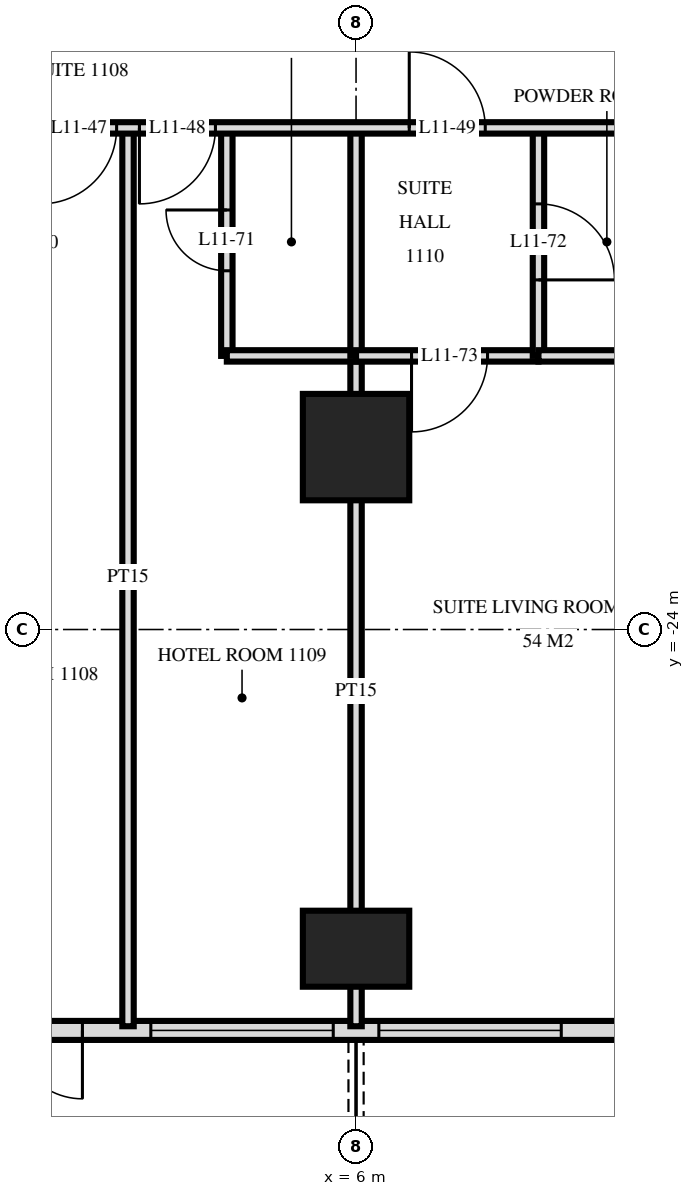
"""IFC4 building model, lengths in metres.
Left out: names, types, materials, properties, quantities, classifications, styles, units other than length and angle.
Written with IfcOpenShell. Run it as: python <this file> out.ifc"""

import sys

from ifc_helpers import new_model, si_unit, direction, frame, frame_2d, origin, origin_2d, place, context, subcontext, project, spatial, rectangle, extrude, element, fill, save


model = new_model("IFC4")
c1 = context("Model", 3, precision=1e-05, world=origin(), true_north=direction((0.0, 1.0)))
c2 = subcontext(c1, "Body", "Model", "MODEL_VIEW")
j1 = project(units=[si_unit("LENGTHUNIT", "METRE"), si_unit("PLANEANGLEUNIT", "RADIAN")], contexts=[c1])
p1 = place(None, origin())
s1 = spatial("IfcSite", under=j1, at=p1, CompositionType="ELEMENT")
p2 = place(p1, origin())
s2 = spatial("IfcBuilding", under=s1, at=p2, CompositionType="ELEMENT")
p3 = place(p2, frame((0.0, 0.0, 49.2)))
s3 = spatial("IfcBuildingStorey", under=s2, at=p3, CompositionType="ELEMENT", Elevation=49.2)
p4 = place(p3, frame((6.0, -28.2, 0.0), z_axis=(0.0, 0.0, 1.0), x_axis=(1.0, 0.0, 0.0)))
e1 = element("IfcColumn", 1, at=p4, inside=s3, PredefinedType="COLUMN", context=c2, shape_type="SweptSolid", body=[
    extrude(rectangle(XDim=1.4, YDim=1.0, at=origin_2d()), origin(), (0.0, 0.0, 1.0), 3.6),
])
p5 = place(p3, frame((6.0, -21.6, 0.0), z_axis=(0.0, 0.0, 1.0), x_axis=(1.0, 0.0, 0.0)))
e2 = element("IfcColumn", 2, at=p5, inside=s3, PredefinedType="COLUMN", context=c2, shape_type="SweptSolid", body=[
    extrude(rectangle(XDim=1.4, YDim=1.4, at=origin_2d()), origin(), (0.0, 0.0, 1.0), 3.6),
])
p6 = place(p3, frame((-28.775, -29.275, 0.0), z_axis=(0.0, 0.0, 1.0), x_axis=(1.0, 0.0, 0.0)))
e3 = element("IfcWall", 3, at=p6, inside=s3, PredefinedType="SOLIDWALL", context=c2, shape_type="SweptSolid", body=[
    extrude(rectangle(XDim=57.551, YDim=0.25, at=frame_2d((28.775, 0.0))), origin(), (0.0, 0.0, 1.0), 3.32),
])
p7 = place(p6, frame((0.575, 0.0, 0.0)))
e4 = element("IfcOpeningElement", 4, at=p7, cuts=e3, PredefinedType="OPENING", context=c2, shape_type="SweptSolid", body=[
    extrude(rectangle(XDim=1.8, YDim=2.4, at=frame_2d((0.9, 1.2))), frame((0.0, 0.135, 0.0), z_axis=(0.0, -1.0, 0.0), x_axis=(1.0, 0.0, 0.0)), (0.0, 0.0, 1.0), 0.27),
])
p8 = place(p6, frame((5.375, 0.0, 0.0)))
e5 = element("IfcOpeningElement", 5, at=p8, cuts=e3, PredefinedType="OPENING", context=c2, shape_type="SweptSolid", body=[
    extrude(rectangle(XDim=1.8, YDim=2.4, at=frame_2d((0.9, 1.2))), frame((0.0, 0.135, 0.0), z_axis=(0.0, -1.0, 0.0), x_axis=(1.0, 0.0, 0.0)), (0.0, 0.0, 1.0), 0.27),
])
p9 = place(p6, frame((8.075, 0.0, 0.3)))
e6 = element("IfcOpeningElement", 6, at=p9, cuts=e3, PredefinedType="OPENING", context=c2, shape_type="SweptSolid", body=[
    extrude(rectangle(XDim=2.4, YDim=2.1, at=frame_2d((1.2, 1.05))), frame((0.0, 0.135, 0.0), z_axis=(0.0, -1.0, 0.0), x_axis=(1.0, 0.0, 0.0)), (0.0, 0.0, 1.0), 0.27),
])
p10 = place(p6, frame((11.375, 0.0, 0.0)))
e7 = element("IfcOpeningElement", 7, at=p10, cuts=e3, PredefinedType="OPENING", context=c2, shape_type="SweptSolid", body=[
    extrude(rectangle(XDim=1.8, YDim=2.4, at=frame_2d((0.9, 1.2))), frame((0.0, 0.135, 0.0), z_axis=(0.0, -1.0, 0.0), x_axis=(1.0, 0.0, 0.0)), (0.0, 0.0, 1.0), 0.27),
])
p11 = place(p6, frame((14.075, 0.0, 0.3)))
e8 = element("IfcOpeningElement", 8, at=p11, cuts=e3, PredefinedType="OPENING", context=c2, shape_type="SweptSolid", body=[
    extrude(rectangle(XDim=2.4, YDim=2.1, at=frame_2d((1.2, 1.05))), frame((0.0, 0.135, 0.0), z_axis=(0.0, -1.0, 0.0), x_axis=(1.0, 0.0, 0.0)), (0.0, 0.0, 1.0), 0.27),
])
p12 = place(p6, frame((17.375, 0.0, 0.0)))
e9 = element("IfcOpeningElement", 9, at=p12, cuts=e3, PredefinedType="OPENING", context=c2, shape_type="SweptSolid", body=[
    extrude(rectangle(XDim=1.8, YDim=2.4, at=frame_2d((0.9, 1.2))), frame((0.0, 0.135, 0.0), z_axis=(0.0, -1.0, 0.0), x_axis=(1.0, 0.0, 0.0)), (0.0, 0.0, 1.0), 0.27),
])
p13 = place(p6, frame((20.075, 0.0, 0.3)))
e10 = element("IfcOpeningElement", 10, at=p13, cuts=e3, PredefinedType="OPENING", context=c2, shape_type="SweptSolid", body=[
    extrude(rectangle(XDim=2.4, YDim=2.1, at=frame_2d((1.2, 1.05))), frame((0.0, 0.135, 0.0), z_axis=(0.0, -1.0, 0.0), x_axis=(1.0, 0.0, 0.0)), (0.0, 0.0, 1.0), 0.27),
])
p14 = place(p6, frame((23.075, 0.0, 0.3)))
e11 = element("IfcOpeningElement", 11, at=p14, cuts=e3, PredefinedType="OPENING", context=c2, shape_type="SweptSolid", body=[
    extrude(rectangle(XDim=2.4, YDim=2.1, at=frame_2d((1.2, 1.05))), frame((0.0, 0.135, 0.0), z_axis=(0.0, -1.0, 0.0), x_axis=(1.0, 0.0, 0.0)), (0.0, 0.0, 1.0), 0.27),
])
p15 = place(p6, frame((26.375, 0.0, 0.0)))
e12 = element("IfcOpeningElement", 12, at=p15, cuts=e3, PredefinedType="OPENING", context=c2, shape_type="SweptSolid", body=[
    extrude(rectangle(XDim=1.8, YDim=2.4, at=frame_2d((0.9, 1.2))), frame((0.0, 0.135, 0.0), z_axis=(0.0, -1.0, 0.0), x_axis=(1.0, 0.0, 0.0)), (0.0, 0.0, 1.0), 0.27),
])
p16 = place(p6, frame((29.375, 0.0, 0.0)))
e13 = element("IfcOpeningElement", 13, at=p16, cuts=e3, PredefinedType="OPENING", context=c2, shape_type="SweptSolid", body=[
    extrude(rectangle(XDim=1.8, YDim=2.4, at=frame_2d((0.9, 1.2))), frame((0.0, 0.135, 0.0), z_axis=(0.0, -1.0, 0.0), x_axis=(1.0, 0.0, 0.0)), (0.0, 0.0, 1.0), 0.27),
])
p17 = place(p6, frame((32.075, 0.0, 0.3)))
e14 = element("IfcOpeningElement", 14, at=p17, cuts=e3, PredefinedType="OPENING", context=c2, shape_type="SweptSolid", body=[
    extrude(rectangle(XDim=2.4, YDim=2.1, at=frame_2d((1.2, 1.05))), frame((0.0, 0.135, 0.0), z_axis=(0.0, -1.0, 0.0), x_axis=(1.0, 0.0, 0.0)), (0.0, 0.0, 1.0), 0.27),
])
p18 = place(p6, frame((35.075, 0.0, 0.3)))
e15 = element("IfcOpeningElement", 15, at=p18, cuts=e3, PredefinedType="OPENING", context=c2, shape_type="SweptSolid", body=[
    extrude(rectangle(XDim=2.4, YDim=2.1, at=frame_2d((1.2, 1.05))), frame((0.0, 0.135, 0.0), z_axis=(0.0, -1.0, 0.0), x_axis=(1.0, 0.0, 0.0)), (0.0, 0.0, 1.0), 0.27),
])
p19 = place(p6, frame((38.375, 0.0, 0.0)))
e16 = element("IfcOpeningElement", 16, at=p19, cuts=e3, PredefinedType="OPENING", context=c2, shape_type="SweptSolid", body=[
    extrude(rectangle(XDim=1.8, YDim=2.4, at=frame_2d((0.9, 1.2))), frame((0.0, 0.135, 0.0), z_axis=(0.0, -1.0, 0.0), x_axis=(1.0, 0.0, 0.0)), (0.0, 0.0, 1.0), 0.27),
])
p20 = place(p6, frame((41.375, 0.0, 0.0)))
e17 = element("IfcOpeningElement", 17, at=p20, cuts=e3, PredefinedType="OPENING", context=c2, shape_type="SweptSolid", body=[
    extrude(rectangle(XDim=1.8, YDim=2.4, at=frame_2d((0.9, 1.2))), frame((0.0, 0.135, 0.0), z_axis=(0.0, -1.0, 0.0), x_axis=(1.0, 0.0, 0.0)), (0.0, 0.0, 1.0), 0.27),
])
p21 = place(p6, frame((44.075, 0.0, 0.3)))
e18 = element("IfcOpeningElement", 18, at=p21, cuts=e3, PredefinedType="OPENING", context=c2, shape_type="SweptSolid", body=[
    extrude(rectangle(XDim=2.4, YDim=2.1, at=frame_2d((1.2, 1.05))), frame((0.0, 0.135, 0.0), z_axis=(0.0, -1.0, 0.0), x_axis=(1.0, 0.0, 0.0)), (0.0, 0.0, 1.0), 0.27),
])
p22 = place(p6, frame((47.075, 0.0, 0.3)))
e19 = element("IfcOpeningElement", 19, at=p22, cuts=e3, PredefinedType="OPENING", context=c2, shape_type="SweptSolid", body=[
    extrude(rectangle(XDim=2.4, YDim=2.1, at=frame_2d((1.2, 1.05))), frame((0.0, 0.135, 0.0), z_axis=(0.0, -1.0, 0.0), x_axis=(1.0, 0.0, 0.0)), (0.0, 0.0, 1.0), 0.27),
])
p23 = place(p6, frame((50.375, 0.0, 0.0)))
e20 = element("IfcOpeningElement", 20, at=p23, cuts=e3, PredefinedType="OPENING", context=c2, shape_type="SweptSolid", body=[
    extrude(rectangle(XDim=1.8, YDim=2.4, at=frame_2d((0.9, 1.2))), frame((0.0, 0.135, 0.0), z_axis=(0.0, -1.0, 0.0), x_axis=(1.0, 0.0, 0.0)), (0.0, 0.0, 1.0), 0.27),
])
p24 = place(p6, frame((53.375, 0.0, 0.0)))
e21 = element("IfcOpeningElement", 21, at=p24, cuts=e3, PredefinedType="OPENING", context=c2, shape_type="SweptSolid", body=[
    extrude(rectangle(XDim=1.8, YDim=2.4, at=frame_2d((0.9, 1.2))), frame((0.0, 0.135, 0.0), z_axis=(0.0, -1.0, 0.0), x_axis=(1.0, 0.0, 0.0)), (0.0, 0.0, 1.0), 0.27),
])
p25 = place(p3, frame((8.4, -20.4, 0.0), z_axis=(0.0, 0.0, 1.0), x_axis=(0.0, 1.0, 0.0)))
e22 = element("IfcWall", 22, at=p25, inside=s3, PredefinedType="PARTITIONING", context=c2, shape_type="SweptSolid", body=[
    extrude(rectangle(XDim=3.0, YDim=0.15, at=frame_2d((1.5, 0.0))), origin(), (0.0, 0.0, 1.0), 3.32),
])
p26 = place(p25, frame((1.0, 0.0, 0.0)))
e23 = element("IfcOpeningElement", 23, at=p26, cuts=e22, PredefinedType="OPENING", context=c2, shape_type="SweptSolid", body=[
    extrude(rectangle(XDim=1.0, YDim=2.1, at=frame_2d((0.5, 1.05))), frame((0.0, 0.085, 0.0), z_axis=(0.0, -1.0, 0.0), x_axis=(1.0, 0.0, 0.0)), (0.0, 0.0, 1.0), 0.17),
])
p27 = place(p3, frame((6.0, -20.4, 0.0), z_axis=(0.0, 0.0, 1.0), x_axis=(0.0, 1.0, 0.0)))
e24 = element("IfcWall", 24, at=p27, inside=s3, PredefinedType="PARTITIONING", context=c2, shape_type="SweptSolid", body=[
    extrude(rectangle(XDim=3.0, YDim=0.15, at=frame_2d((1.5, 0.0))), origin(), (0.0, 0.0, 1.0), 3.32),
])
p28 = place(p3, frame((6.0, -29.22, 0.0), z_axis=(0.0, 0.0, 1.0), x_axis=(0.0, 1.0, 0.0)))
e25 = element("IfcWall", 25, at=p28, inside=s3, PredefinedType="PARTITIONING", context=c2, shape_type="SweptSolid", body=[
    extrude(rectangle(XDim=8.82, YDim=0.15, at=frame_2d((4.41, 0.0))), origin(), (0.0, 0.0, 1.0), 3.32),
])
p29 = place(p3, frame((4.3, -20.4, 0.0), z_axis=(0.0, 0.0, 1.0), x_axis=(0.0, 1.0, 0.0)))
e26 = element("IfcWall", 26, at=p29, inside=s3, PredefinedType="PARTITIONING", context=c2, shape_type="SweptSolid", body=[
    extrude(rectangle(XDim=3.0, YDim=0.15, at=frame_2d((1.5, 0.0))), origin(), (0.0, 0.0, 1.0), 3.32),
])
p30 = place(p29, frame((1.12, 0.0, 0.0)))
e27 = element("IfcOpeningElement", 27, at=p30, cuts=e26, PredefinedType="OPENING", context=c2, shape_type="SweptSolid", body=[
    extrude(rectangle(XDim=0.8, YDim=2.1, at=frame_2d((0.4, 1.05))), frame((0.0, 0.085, 0.0), z_axis=(0.0, -1.0, 0.0), x_axis=(1.0, 0.0, 0.0)), (0.0, 0.0, 1.0), 0.17),
])
p31 = place(p3, frame((3.0, -29.22, 0.0), z_axis=(0.0, 0.0, 1.0), x_axis=(0.0, 1.0, 0.0)))
e28 = element("IfcWall", 28, at=p31, inside=s3, PredefinedType="PARTITIONING", context=c2, shape_type="SweptSolid", body=[
    extrude(rectangle(XDim=11.82, YDim=0.15, at=frame_2d((5.91, 0.0))), origin(), (0.0, 0.0, 1.0), 3.32),
])
p32 = place(p3, frame((6.0, -20.4, 0.0), z_axis=(0.0, 0.0, 1.0), x_axis=(1.0, 0.0, 0.0)))
e29 = element("IfcWall", 29, at=p32, inside=s3, PredefinedType="PARTITIONING", context=c2, shape_type="SweptSolid", body=[
    extrude(rectangle(XDim=2.4, YDim=0.15, at=frame_2d((1.2, 0.0))), origin(), (0.0, 0.0, 1.0), 3.32),
])
p33 = place(p32, frame((0.73, 0.0, 0.0)))
e30 = element("IfcOpeningElement", 30, at=p33, cuts=e29, PredefinedType="OPENING", context=c2, shape_type="SweptSolid", body=[
    extrude(rectangle(XDim=1.0, YDim=2.1, at=frame_2d((0.5, 1.05))), frame((0.0, 0.085, 0.0), z_axis=(0.0, -1.0, 0.0), x_axis=(1.0, 0.0, 0.0)), (0.0, 0.0, 1.0), 0.17),
])
p34 = place(p3, frame((4.3, -20.4, 0.0), z_axis=(0.0, 0.0, 1.0), x_axis=(1.0, 0.0, 0.0)))
e31 = element("IfcWall", 31, at=p34, inside=s3, PredefinedType="PARTITIONING", context=c2, shape_type="SweptSolid", body=[
    extrude(rectangle(XDim=1.7, YDim=0.15, at=frame_2d((0.85, 0.0))), origin(), (0.0, 0.0, 1.0), 3.32),
])
p35 = place(p3, frame((8.4, -20.4, 0.0), z_axis=(0.0, 0.0, 1.0), x_axis=(1.0, 0.0, 0.0)))
e32 = element("IfcWall", 32, at=p35, inside=s3, PredefinedType="PLUMBINGWALL", context=c2, shape_type="SweptSolid", body=[
    extrude(rectangle(XDim=1.8, YDim=0.15, at=frame_2d((0.9, 0.0))), origin(), (0.0, 0.0, 1.0), 3.32),
])
p36 = place(p3, frame((-33.12, -17.4, 0.0), z_axis=(0.0, 0.0, 1.0), x_axis=(1.0, 0.0, 0.0)))
e33 = element("IfcWall", 33, at=p36, inside=s3, PredefinedType="PARTITIONING", context=c2, shape_type="SweptSolid", body=[
    extrude(rectangle(XDim=66.24, YDim=0.15, at=frame_2d((33.12, 0.0))), origin(), (0.0, 0.0, 1.0), 3.32),
])
p37 = place(p36, frame((9.27, 0.0, 0.0)))
e34 = element("IfcOpeningElement", 34, at=p37, cuts=e33, PredefinedType="OPENING", context=c2, shape_type="SweptSolid", body=[
    extrude(rectangle(XDim=1.0, YDim=2.1, at=frame_2d((0.5, 1.05))), frame((0.0, 0.085, 0.0), z_axis=(0.0, -1.0, 0.0), x_axis=(1.0, 0.0, 0.0)), (0.0, 0.0, 1.0), 0.17),
])
p38 = place(p36, frame((13.97, 0.0, 0.0)))
e35 = element("IfcOpeningElement", 35, at=p38, cuts=e33, PredefinedType="OPENING", context=c2, shape_type="SweptSolid", body=[
    extrude(rectangle(XDim=1.0, YDim=2.1, at=frame_2d((0.5, 1.05))), frame((0.0, 0.085, 0.0), z_axis=(0.0, -1.0, 0.0), x_axis=(1.0, 0.0, 0.0)), (0.0, 0.0, 1.0), 0.17),
])
p39 = place(p36, frame((15.27, 0.0, 0.0)))
e36 = element("IfcOpeningElement", 36, at=p39, cuts=e33, PredefinedType="OPENING", context=c2, shape_type="SweptSolid", body=[
    extrude(rectangle(XDim=1.0, YDim=2.1, at=frame_2d((0.5, 1.05))), frame((0.0, 0.085, 0.0), z_axis=(0.0, -1.0, 0.0), x_axis=(1.0, 0.0, 0.0)), (0.0, 0.0, 1.0), 0.17),
])
p40 = place(p36, frame((19.97, 0.0, 0.0)))
e37 = element("IfcOpeningElement", 37, at=p40, cuts=e33, PredefinedType="OPENING", context=c2, shape_type="SweptSolid", body=[
    extrude(rectangle(XDim=1.0, YDim=2.1, at=frame_2d((0.5, 1.05))), frame((0.0, 0.085, 0.0), z_axis=(0.0, -1.0, 0.0), x_axis=(1.0, 0.0, 0.0)), (0.0, 0.0, 1.0), 0.17),
])
p41 = place(p36, frame((22.27, 0.0, 0.0)))
e38 = element("IfcOpeningElement", 38, at=p41, cuts=e33, PredefinedType="OPENING", context=c2, shape_type="SweptSolid", body=[
    extrude(rectangle(XDim=1.0, YDim=2.1, at=frame_2d((0.5, 1.05))), frame((0.0, 0.085, 0.0), z_axis=(0.0, -1.0, 0.0), x_axis=(1.0, 0.0, 0.0)), (0.0, 0.0, 1.0), 0.17),
])
p42 = place(p36, frame((28.97, 0.0, 0.0)))
e39 = element("IfcOpeningElement", 39, at=p42, cuts=e33, PredefinedType="OPENING", context=c2, shape_type="SweptSolid", body=[
    extrude(rectangle(XDim=1.0, YDim=2.1, at=frame_2d((0.5, 1.05))), frame((0.0, 0.085, 0.0), z_axis=(0.0, -1.0, 0.0), x_axis=(1.0, 0.0, 0.0)), (0.0, 0.0, 1.0), 0.17),
])
p43 = place(p36, frame((30.27, 0.0, 0.0)))
e40 = element("IfcOpeningElement", 40, at=p43, cuts=e33, PredefinedType="OPENING", context=c2, shape_type="SweptSolid", body=[
    extrude(rectangle(XDim=1.0, YDim=2.1, at=frame_2d((0.5, 1.05))), frame((0.0, 0.085, 0.0), z_axis=(0.0, -1.0, 0.0), x_axis=(1.0, 0.0, 0.0)), (0.0, 0.0, 1.0), 0.17),
])
p44 = place(p36, frame((34.97, 0.0, 0.0)))
e41 = element("IfcOpeningElement", 41, at=p44, cuts=e33, PredefinedType="OPENING", context=c2, shape_type="SweptSolid", body=[
    extrude(rectangle(XDim=1.0, YDim=2.1, at=frame_2d((0.5, 1.05))), frame((0.0, 0.085, 0.0), z_axis=(0.0, -1.0, 0.0), x_axis=(1.0, 0.0, 0.0)), (0.0, 0.0, 1.0), 0.17),
])
p45 = place(p36, frame((36.27, 0.0, 0.0)))
e42 = element("IfcOpeningElement", 42, at=p45, cuts=e33, PredefinedType="OPENING", context=c2, shape_type="SweptSolid", body=[
    extrude(rectangle(XDim=1.0, YDim=2.1, at=frame_2d((0.5, 1.05))), frame((0.0, 0.085, 0.0), z_axis=(0.0, -1.0, 0.0), x_axis=(1.0, 0.0, 0.0)), (0.0, 0.0, 1.0), 0.17),
])
p46 = place(p36, frame((39.82, 0.0, 0.0)))
e43 = element("IfcOpeningElement", 43, at=p46, cuts=e33, PredefinedType="OPENING", context=c2, shape_type="SweptSolid", body=[
    extrude(rectangle(XDim=1.0, YDim=2.1, at=frame_2d((0.5, 1.05))), frame((0.0, 0.085, 0.0), z_axis=(0.0, -1.0, 0.0), x_axis=(1.0, 0.0, 0.0)), (0.0, 0.0, 1.0), 0.17),
])
p47 = place(p36, frame((51.27, 0.0, 0.0)))
e44 = element("IfcOpeningElement", 44, at=p47, cuts=e33, PredefinedType="OPENING", context=c2, shape_type="SweptSolid", body=[
    extrude(rectangle(XDim=1.0, YDim=2.1, at=frame_2d((0.5, 1.05))), frame((0.0, 0.085, 0.0), z_axis=(0.0, -1.0, 0.0), x_axis=(1.0, 0.0, 0.0)), (0.0, 0.0, 1.0), 0.17),
])
p48 = place(p36, frame((4.42, 0.0, 0.0)))
e45 = element("IfcOpeningElement", 45, at=p48, cuts=e33, PredefinedType="OPENING", context=c2, shape_type="SweptSolid", body=[
    extrude(rectangle(XDim=1.0, YDim=2.1, at=frame_2d((0.5, 1.05))), frame((0.0, 0.085, 0.0), z_axis=(0.0, -1.0, 0.0), x_axis=(1.0, 0.0, 0.0)), (0.0, 0.0, 1.0), 0.17),
])
p49 = place(p36, frame((54.82, 0.0, 0.0)))
e46 = element("IfcOpeningElement", 46, at=p49, cuts=e33, PredefinedType="OPENING", context=c2, shape_type="SweptSolid", body=[
    extrude(rectangle(XDim=1.0, YDim=2.1, at=frame_2d((0.5, 1.05))), frame((0.0, 0.085, 0.0), z_axis=(0.0, -1.0, 0.0), x_axis=(1.0, 0.0, 0.0)), (0.0, 0.0, 1.0), 0.17),
])
p50 = place(p16, frame((0.9, 0.0, 0.0), z_axis=(0.0, 0.0, 1.0), x_axis=(-1.0, 0.0, 0.0)))
e47 = element("IfcDoor", 47, at=p50, inside=s3, OperationType="DOUBLE_DOOR_SINGLE_SWING", PredefinedType="DOOR", context=c2, shape_type="SweptSolid", body=[
    extrude(rectangle(XDim=1.8, YDim=2.4, at=frame_2d((0.0, 1.2))), frame((0.0, -0.025, 0.0), z_axis=(0.0, 1.0, 0.0), x_axis=(-1.0, 0.0, 0.0)), (0.0, 0.0, 1.0), 0.05),
])
fill(e13, e47)
p51 = place(p17, origin())
e48 = element("IfcWindow", 48, at=p51, inside=s3, PartitioningType="SINGLE_PANEL", PredefinedType="WINDOW", context=c2, shape_type="SweptSolid", body=[
    extrude(rectangle(XDim=2.4, YDim=2.1, at=frame_2d((1.2, 1.05))), frame((0.0, 0.03, 0.0), z_axis=(0.0, -1.0, 0.0), x_axis=(1.0, 0.0, 0.0)), (0.0, 0.0, 1.0), 0.06),
])
fill(e14, e48)
p52 = place(p18, origin())
e49 = element("IfcWindow", 49, at=p52, inside=s3, PartitioningType="SINGLE_PANEL", PredefinedType="WINDOW", context=c2, shape_type="SweptSolid", body=[
    extrude(rectangle(XDim=2.4, YDim=2.1, at=frame_2d((1.2, 1.05))), frame((0.0, 0.03, 0.0), z_axis=(0.0, -1.0, 0.0), x_axis=(1.0, 0.0, 0.0)), (0.0, 0.0, 1.0), 0.06),
])
fill(e15, e49)
p53 = place(p44, frame((0.5, 0.0, 0.0), z_axis=(0.0, 0.0, 1.0), x_axis=(-1.0, 0.0, 0.0)))
e50 = element("IfcDoor", 50, at=p53, inside=s3, OperationType="SINGLE_SWING_LEFT", PredefinedType="DOOR", context=c2, shape_type="SweptSolid", body=[
    extrude(rectangle(XDim=1.0, YDim=2.1, at=frame_2d((0.0, 1.05))), frame((0.0, -0.025, 0.0), z_axis=(0.0, 1.0, 0.0), x_axis=(-1.0, 0.0, 0.0)), (0.0, 0.0, 1.0), 0.05),
])
fill(e41, e50)
p54 = place(p45, frame((0.5, 0.0, 0.0), z_axis=(0.0, 0.0, 1.0), x_axis=(-1.0, 0.0, 0.0)))
e51 = element("IfcDoor", 51, at=p54, inside=s3, OperationType="SINGLE_SWING_LEFT", PredefinedType="DOOR", context=c2, shape_type="SweptSolid", body=[
    extrude(rectangle(XDim=1.0, YDim=2.1, at=frame_2d((0.0, 1.05))), frame((0.0, -0.025, 0.0), z_axis=(0.0, 1.0, 0.0), x_axis=(-1.0, 0.0, 0.0)), (0.0, 0.0, 1.0), 0.05),
])
fill(e42, e51)
p55 = place(p46, origin())
e52 = element("IfcDoor", 52, at=p55, inside=s3, OperationType="SINGLE_SWING_RIGHT", PredefinedType="DOOR", context=c2, shape_type="SweptSolid", body=[
    extrude(rectangle(XDim=1.0, YDim=2.1, at=frame_2d((0.5, 1.05))), frame((0.0, 0.025, 0.0), z_axis=(0.0, -1.0, 0.0), x_axis=(1.0, 0.0, 0.0)), (0.0, 0.0, 1.0), 0.05),
])
fill(e43, e52)
p56 = place(p30, origin())
e53 = element("IfcDoor", 53, at=p56, inside=s3, OperationType="SINGLE_SWING_LEFT", PredefinedType="DOOR", context=c2, shape_type="SweptSolid", body=[
    extrude(rectangle(XDim=0.8, YDim=2.1, at=frame_2d((0.4, 1.05))), frame((0.0, 0.025, 0.0), z_axis=(0.0, -1.0, 0.0), x_axis=(1.0, 0.0, 0.0)), (0.0, 0.0, 1.0), 0.05),
])
fill(e27, e53)
p57 = place(p26, frame((0.5, 0.0, 0.0), z_axis=(0.0, 0.0, 1.0), x_axis=(-1.0, 0.0, 0.0)))
e54 = element("IfcDoor", 54, at=p57, inside=s3, OperationType="SINGLE_SWING_LEFT", PredefinedType="DOOR", context=c2, shape_type="SweptSolid", body=[
    extrude(rectangle(XDim=1.0, YDim=2.1, at=frame_2d((0.0, 1.05))), frame((0.0, -0.025, 0.0), z_axis=(0.0, 1.0, 0.0), x_axis=(-1.0, 0.0, 0.0)), (0.0, 0.0, 1.0), 0.05),
])
fill(e23, e54)
p58 = place(p33, frame((0.5, 0.0, 0.0), z_axis=(0.0, 0.0, 1.0), x_axis=(-1.0, 0.0, 0.0)))
e55 = element("IfcDoor", 55, at=p58, inside=s3, OperationType="SINGLE_SWING_LEFT", PredefinedType="DOOR", context=c2, shape_type="SweptSolid", body=[
    extrude(rectangle(XDim=1.0, YDim=2.1, at=frame_2d((0.0, 1.05))), frame((0.0, -0.025, 0.0), z_axis=(0.0, 1.0, 0.0), x_axis=(-1.0, 0.0, 0.0)), (0.0, 0.0, 1.0), 0.05),
])
fill(e30, e55)
save(model, sys.argv[1])
